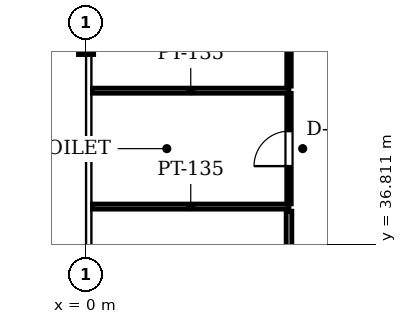
"""IFC4 building model, lengths in metres.
Left out: names, types, materials, properties, quantities, classifications, styles, units other than length and angle.
Written with IfcOpenShell. Run it as: python <this file> out.ifc"""

import sys

from ifc_helpers import new_model, si_unit, direction, frame, frame_2d, origin, origin_2d, place, context, subcontext, project, spatial, rectangle, i_section, extrude, element, fill, save


model = new_model("IFC4")
c1 = context("Model", 3, precision=1e-05, world=origin(), true_north=direction((0.0, 1.0)))
c2 = subcontext(c1, "Body", "Model", "MODEL_VIEW")
j1 = project(units=[si_unit("LENGTHUNIT", "METRE"), si_unit("PLANEANGLEUNIT", "RADIAN")], contexts=[c1])
p1 = place(None, origin())
s1 = spatial("IfcSite", under=j1, at=p1, CompositionType="ELEMENT")
p2 = place(p1, origin())
s2 = spatial("IfcBuilding", under=s1, at=p2, CompositionType="ELEMENT")
p3 = place(p2, frame((0.0, 0.0, 154.1)))
s3 = spatial("IfcBuildingStorey", under=s2, at=p3, CompositionType="ELEMENT", Elevation=154.1)
p4 = place(p3, frame((0.0, 42.0, 0.0), z_axis=(0.0, 0.0, 1.0), x_axis=(1.0, 0.0, 0.0)))
e1 = element("IfcColumn", 1, at=p4, inside=s3, PredefinedType="COLUMN", context=c2, shape_type="SweptSolid", body=[
    extrude(i_section(OverallWidth=0.4, OverallDepth=0.4, WebThickness=0.025, FlangeThickness=0.04, at=origin_2d()), origin(), (0.0, 0.0, 1.0), 4.1),
])
for number, where, z_axis, x_axis in (
    (2, (5.34, 40.85, 0.0), (0.0, 0.0, 1.0), (-1.0, 0.0, 0.0)),
    (3, (0.169, 37.8, 0.0), (0.0, 0.0, 1.0), (1.0, 0.0, 0.0)),
):
    element("IfcWall", number, at=place(p3, frame(where, z_axis=z_axis, x_axis=x_axis)), inside=s3, PredefinedType="PARTITIONING", context=c2, shape_type="SweptSolid", body=[
        extrude(rectangle(XDim=5.171, YDim=0.135, at=frame_2d((2.585, 0.0))), origin(), (0.0, 0.0, 1.0), 3.469),
    ])
p5 = place(p3, frame((5.34, 37.872, 0.0), z_axis=(0.0, 0.0, 1.0), x_axis=(0.0, 1.0, 0.0)))
e4 = element("IfcWall", 4, at=p5, inside=s3, PredefinedType="PARTITIONING", context=c2, shape_type="SweptSolid", body=[
    extrude(rectangle(XDim=2.907, YDim=0.12, at=frame_2d((1.454, 0.0))), origin(), (0.0, 0.0, 1.0), 3.825),
])
p6 = place(p5, frame((0.993, 0.0, 0.0)))
e5 = element("IfcOpeningElement", 5, at=p6, cuts=e4, PredefinedType="OPENING", context=c2, shape_type="SweptSolid", body=[
    extrude(rectangle(XDim=0.92, YDim=2.1, at=frame_2d((0.46, 1.05))), frame((0.0, 0.07, 0.0), z_axis=(0.0, -1.0, 0.0), x_axis=(1.0, 0.0, 0.0)), (0.0, 0.0, 1.0), 0.14),
])
p7 = place(p3, frame((5.34, 5.394, 0.0), z_axis=(0.0, 0.0, 1.0), x_axis=(-7.561837e-06, 0.999999999971, 0.0)))
e6 = element("IfcWall", 6, at=p7, inside=s3, PredefinedType="PARTITIONING", context=c2, shape_type="SweptSolid", body=[
    extrude(rectangle(XDim=32.286, YDim=0.15, at=frame_2d((16.143, 0.0))), origin(), (0.0, 0.0, 1.0), 3.292),
])
p8 = place(p7, frame((15.668, 0.0, 0.0)))
e7 = element("IfcOpeningElement", 7, at=p8, cuts=e6, PredefinedType="OPENING", context=c2, shape_type="SweptSolid", body=[
    extrude(rectangle(XDim=0.95, YDim=2.15, at=frame_2d((0.475, 1.075))), frame((0.0, 0.085, 0.0), z_axis=(0.0, -1.0, 0.0), x_axis=(1.0, 0.0, 0.0)), (0.0, 0.0, 1.0), 0.17),
])
p9 = place(p3, frame((5.34, 40.97, 0.0), z_axis=(0.0, 0.0, 1.0), x_axis=(0.0, 1.0, 0.0)))
e8 = element("IfcWall", 8, at=p9, inside=s3, PredefinedType="PARTITIONING", context=c2, shape_type="SweptSolid", body=[
    extrude(rectangle(XDim=2.03, YDim=0.12, at=frame_2d((1.015, 0.0))), origin(), (0.0, 0.0, 1.0), 3.292),
])
p10 = place(p6, origin())
e9 = element("IfcDoor", 9, at=p10, inside=s3, OperationType="SINGLE_SWING_LEFT", PredefinedType="DOOR", context=c2, shape_type="SweptSolid", body=[
    extrude(rectangle(XDim=0.92, YDim=2.1, at=frame_2d((0.46, 1.05))), frame((0.0, 0.025, 0.0), z_axis=(0.0, -1.0, 0.0), x_axis=(1.0, 0.0, 0.0)), (0.0, 0.0, 1.0), 0.05),
])
fill(e5, e9)
save(model, sys.argv[1])
